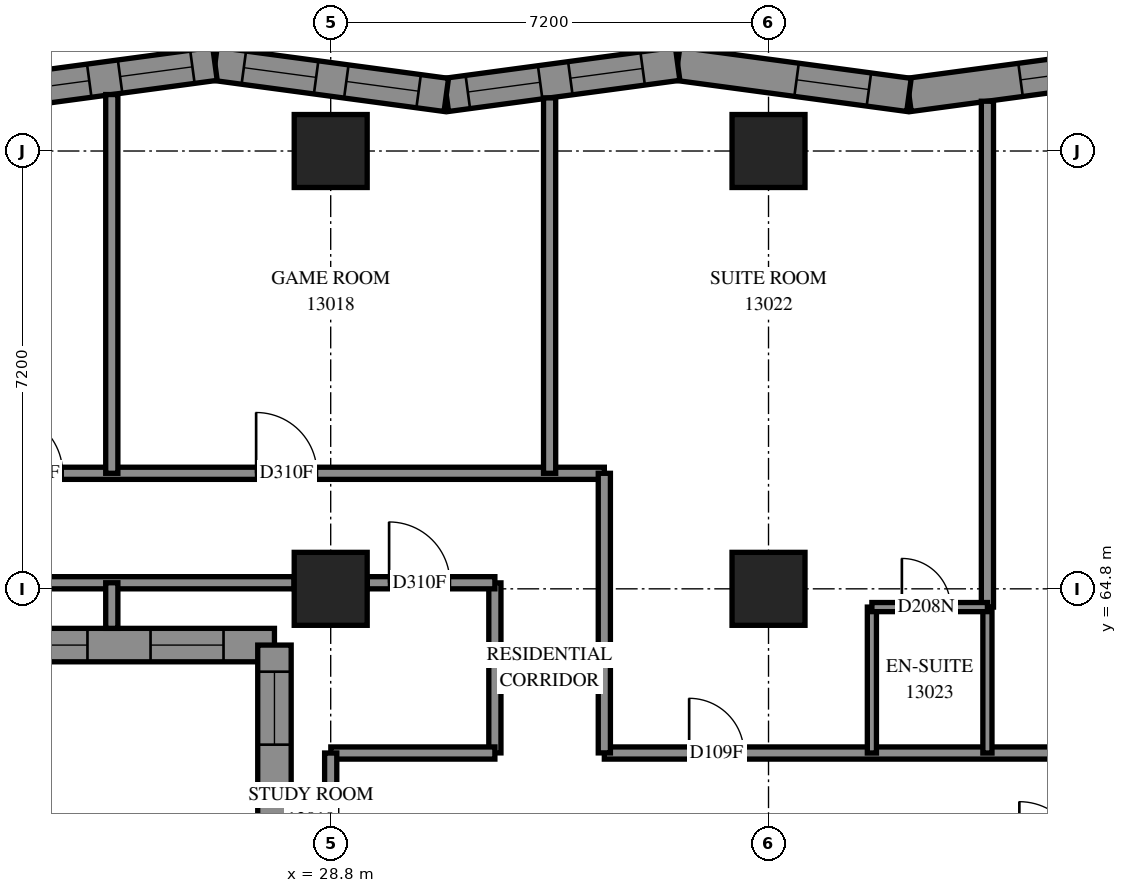
"""IFC4 building model, lengths in metres.
Left out: names, types, materials, properties, quantities, classifications, styles, units other than length and angle.
Written with IfcOpenShell. Run it as: python <this file> out.ifc"""

import sys

from ifc_helpers import new_model, si_unit, direction, frame, frame_2d, origin, origin_2d, place, context, subcontext, project, spatial, polyline, rectangle, outline, extrude, element, fill, save


model = new_model("IFC4")
c1 = context("Model", 3, precision=1e-05, world=origin(), true_north=direction((0.0, 1.0)))
c2 = subcontext(c1, "Body", "Model", "MODEL_VIEW")
j1 = project(units=[si_unit("LENGTHUNIT", "METRE"), si_unit("PLANEANGLEUNIT", "RADIAN")], contexts=[c1])
p1 = place(None, origin())
s1 = spatial("IfcSite", under=j1, at=p1, CompositionType="ELEMENT")
p2 = place(p1, origin())
s2 = spatial("IfcBuilding", under=s1, at=p2, CompositionType="ELEMENT")
p3 = place(p2, frame((0.0, 0.0, 50.8)))
s3 = spatial("IfcBuildingStorey", under=s2, at=p3, CompositionType="ELEMENT", Elevation=50.8)
for number, where, z_axis, x_axis in (
    (1, (28.8, 64.8, 0.0), (0.0, 0.0, 1.0), (1.0, 0.0, 0.0)),
    (2, (28.8, 72.0, 0.0), (0.0, 0.0, 1.0), (1.0, 0.0, 0.0)),
    (3, (36.0, 64.8, 0.0), (0.0, 0.0, 1.0), (1.0, 0.0, 0.0)),
    (4, (36.0, 72.0, 0.0), (0.0, 0.0, 1.0), (1.0, 0.0, 0.0)),
):
    element("IfcColumn", number, at=place(p3, frame(where, z_axis=z_axis, x_axis=x_axis)), inside=s3, PredefinedType="COLUMN", context=c2, shape_type="SweptSolid", body=[
        extrude(rectangle(XDim=1.2, YDim=1.2, at=origin_2d()), origin(), (0.0, 0.0, 1.0), 3.1),
    ])
p4 = place(p3, frame((42.114, 73.434, 0.0), z_axis=(0.0, 0.0, 1.0), x_axis=(-0.9910647018, -0.133381996, 0.0)))
e5 = element("IfcWall", 5, at=p4, inside=s3, PredefinedType="SOLIDWALL", context=c2, shape_type="SweptSolid", body=[
    extrude(outline(polyline([(-0.037, -0.275), (3.802, -0.275), (3.876, 0.275), (0.037, 0.275), (-0.037, -0.275)])), origin(), (0.0, 0.0, 1.0), 3.1),
])
p5 = place(p4, frame((0.787, 0.0, 0.5)))
e6 = element("IfcOpeningElement", 6, at=p5, cuts=e5, PredefinedType="OPENING", context=c2, shape_type="SweptSolid", body=[
    extrude(rectangle(XDim=1.2, YDim=2.45, at=frame_2d((0.6, 1.225))), frame((0.0, 0.285, 0.0), z_axis=(0.0, -1.0, 0.0), x_axis=(1.0, 0.0, 0.0)), (0.0, 0.0, 1.0), 0.57),
])
p6 = place(p3, frame((38.31, 72.922, 0.0), z_axis=(0.0, 0.0, 1.0), x_axis=(-0.9910651652, 0.1333785524, 0.0)))
e7 = element("IfcWall", 7, at=p6, inside=s3, PredefinedType="SOLIDWALL", context=c2, shape_type="SweptSolid", body=[
    extrude(outline(polyline([(0.037, -0.275), (3.876, -0.275), (3.802, 0.275), (-0.037, 0.275), (0.037, -0.275)])), origin(), (0.0, 0.0, 1.0), 3.1),
])
p7 = place(p6, frame((0.665, 0.0, 0.5)))
e8 = element("IfcOpeningElement", 8, at=p7, cuts=e7, PredefinedType="OPENING", context=c2, shape_type="SweptSolid", body=[
    extrude(rectangle(XDim=1.2, YDim=2.45, at=frame_2d((0.6, 1.225))), frame((0.0, 0.285, 0.0), z_axis=(0.0, -1.0, 0.0), x_axis=(1.0, 0.0, 0.0)), (0.0, 0.0, 1.0), 0.57),
])
p8 = place(p3, frame((34.505, 73.434, 0.0), z_axis=(0.0, 0.0, 1.0), x_axis=(-0.9910647018, -0.133381996, 0.0)))
e9 = element("IfcWall", 9, at=p8, inside=s3, PredefinedType="SOLIDWALL", context=c2, shape_type="SweptSolid", body=[
    extrude(outline(polyline([(-0.037, -0.275), (3.802, -0.275), (3.876, 0.275), (0.037, 0.275), (-0.037, -0.275)])), origin(), (0.0, 0.0, 1.0), 3.1),
])
p9 = place(p8, frame((0.581, 0.0, 0.5)))
e10 = element("IfcOpeningElement", 10, at=p9, cuts=e9, PredefinedType="OPENING", context=c2, shape_type="SweptSolid", body=[
    extrude(rectangle(XDim=1.2, YDim=2.45, at=frame_2d((0.6, 1.225))), frame((0.0, 0.285, 0.0), z_axis=(0.0, -1.0, 0.0), x_axis=(1.0, 0.0, 0.0)), (0.0, 0.0, 1.0), 0.57),
])
p10 = place(p8, frame((2.281, 0.0, 0.5)))
e11 = element("IfcOpeningElement", 11, at=p10, cuts=e9, PredefinedType="OPENING", context=c2, shape_type="SweptSolid", body=[
    extrude(rectangle(XDim=1.2, YDim=2.45, at=frame_2d((0.6, 1.225))), frame((0.0, 0.285, 0.0), z_axis=(0.0, -1.0, 0.0), x_axis=(1.0, 0.0, 0.0)), (0.0, 0.0, 1.0), 0.57),
])
p11 = place(p3, frame((30.701, 72.922, 0.0), z_axis=(0.0, 0.0, 1.0), x_axis=(-0.9910651652, 0.1333785524, 0.0)))
e12 = element("IfcWall", 12, at=p11, inside=s3, PredefinedType="SOLIDWALL", context=c2, shape_type="SweptSolid", body=[
    extrude(outline(polyline([(0.037, -0.275), (3.876, -0.275), (3.802, 0.275), (-0.037, 0.275), (0.037, -0.275)])), origin(), (0.0, 0.0, 1.0), 3.1),
])
p12 = place(p11, frame((0.459, 0.0, 0.5)))
e13 = element("IfcOpeningElement", 13, at=p12, cuts=e12, PredefinedType="OPENING", context=c2, shape_type="SweptSolid", body=[
    extrude(rectangle(XDim=1.2, YDim=2.45, at=frame_2d((0.6, 1.225))), frame((0.0, 0.285, 0.0), z_axis=(0.0, -1.0, 0.0), x_axis=(1.0, 0.0, 0.0)), (0.0, 0.0, 1.0), 0.57),
])
p13 = place(p11, frame((2.16, 0.0, 0.5)))
e14 = element("IfcOpeningElement", 14, at=p13, cuts=e12, PredefinedType="OPENING", context=c2, shape_type="SweptSolid", body=[
    extrude(rectangle(XDim=1.2, YDim=2.45, at=frame_2d((0.6, 1.225))), frame((0.0, 0.285, 0.0), z_axis=(0.0, -1.0, 0.0), x_axis=(1.0, 0.0, 0.0)), (0.0, 0.0, 1.0), 0.57),
])
p14 = place(p3, frame((26.897, 73.434, 0.0), z_axis=(0.0, 0.0, 1.0), x_axis=(-0.9910665233, -0.1333684607, 0.0)))
e15 = element("IfcWall", 15, at=p14, inside=s3, PredefinedType="SOLIDWALL", context=c2, shape_type="SweptSolid", body=[
    extrude(outline(polyline([(-0.037, -0.275), (3.802, -0.275), (3.918, 0.275), (0.037, 0.275), (-0.037, -0.275)])), origin(), (0.0, 0.0, 1.0), 3.1),
])
p15 = place(p14, frame((0.374, 0.0, 0.5)))
e16 = element("IfcOpeningElement", 16, at=p15, cuts=e15, PredefinedType="OPENING", context=c2, shape_type="SweptSolid", body=[
    extrude(rectangle(XDim=1.2, YDim=2.45, at=frame_2d((0.6, 1.225))), frame((0.0, 0.285, 0.0), z_axis=(0.0, -1.0, 0.0), x_axis=(1.0, 0.0, 0.0)), (0.0, 0.0, 1.0), 0.57),
])
p16 = place(p14, frame((2.086, 0.0, 0.5)))
e17 = element("IfcOpeningElement", 17, at=p16, cuts=e15, PredefinedType="OPENING", context=c2, shape_type="SweptSolid", body=[
    extrude(rectangle(XDim=1.2, YDim=2.45, at=frame_2d((0.6, 1.225))), frame((0.0, 0.285, 0.0), z_axis=(0.0, -1.0, 0.0), x_axis=(1.0, 0.0, 0.0)), (0.0, 0.0, 1.0), 0.57),
])
p17 = place(p3, frame((19.563, 63.875, 0.0), z_axis=(0.0, 0.0, 1.0), x_axis=(1.0, 0.0, 0.0)))
e18 = element("IfcWall", 18, at=p17, inside=s3, PredefinedType="SOLIDWALL", context=c2, shape_type="SweptSolid", body=[
    extrude(outline(polyline([(-0.275, -0.275), (8.037, -0.275), (8.587, 0.275), (0.275, 0.275), (-0.275, -0.275)])), origin(), (0.0, 0.0, 1.0), 3.1),
])
p18 = place(p17, frame((2.437, 0.0, 0.5)))
e19 = element("IfcOpeningElement", 19, at=p18, cuts=e18, PredefinedType="OPENING", context=c2, shape_type="SweptSolid", body=[
    extrude(rectangle(XDim=2.8, YDim=2.45, at=frame_2d((1.4, 1.225))), frame((0.0, 0.285, 0.0), z_axis=(0.0, -1.0, 0.0), x_axis=(1.0, 0.0, 0.0)), (0.0, 0.0, 1.0), 0.57),
])
p19 = place(p17, frame((6.274, 0.0, 0.5)))
e20 = element("IfcOpeningElement", 20, at=p19, cuts=e18, PredefinedType="OPENING", context=c2, shape_type="SweptSolid", body=[
    extrude(rectangle(XDim=1.2, YDim=2.45, at=frame_2d((0.6, 1.225))), frame((0.0, 0.285, 0.0), z_axis=(0.0, -1.0, 0.0), x_axis=(1.0, 0.0, 0.0)), (0.0, 0.0, 1.0), 0.57),
])
p20 = place(p3, frame((27.875, 63.875, 0.0), z_axis=(0.0, 0.0, 1.0), x_axis=(0.0, -1.0, 0.0)))
e21 = element("IfcWall", 21, at=p20, inside=s3, PredefinedType="SOLIDWALL", context=c2, shape_type="SweptSolid", body=[
    extrude(outline(polyline([(0.275, -0.275), (8.587, -0.275), (8.037, 0.275), (-0.275, 0.275), (0.275, -0.275)])), origin(), (0.0, 0.0, 1.0), 3.1),
])
p21 = place(p20, frame((0.438, 0.0, 0.5)))
e22 = element("IfcOpeningElement", 22, at=p21, cuts=e21, PredefinedType="OPENING", context=c2, shape_type="SweptSolid", body=[
    extrude(rectangle(XDim=1.2, YDim=2.45, at=frame_2d((0.6, 1.225))), frame((0.0, 0.285, 0.0), z_axis=(0.0, -1.0, 0.0), x_axis=(1.0, 0.0, 0.0)), (0.0, 0.0, 1.0), 0.57),
])
p22 = place(p20, frame((3.875, 0.0, 0.7)))
e23 = element("IfcOpeningElement", 23, at=p22, cuts=e21, PredefinedType="OPENING", context=c2, shape_type="SweptSolid", body=[
    extrude(rectangle(XDim=1.8, YDim=2.2, at=frame_2d((0.9, 1.1))), frame((0.0, 0.285, 0.0), z_axis=(0.0, -1.0, 0.0), x_axis=(1.0, 0.0, 0.0)), (0.0, 0.0, 1.0), 0.57),
])
p23 = place(p3, frame((33.3, 62.1, 0.0), z_axis=(0.0, 0.0, 1.0), x_axis=(1.0, 0.0, 0.0)))
e24 = element("IfcWall", 24, at=p23, inside=s3, PredefinedType="PARTITIONING", context=c2, shape_type="SweptSolid", body=[
    extrude(rectangle(XDim=21.2, YDim=0.2, at=frame_2d((10.6, 0.0))), origin(), (0.0, 0.0, 1.0), 3.1),
])
p24 = place(p23, frame((1.395, 0.0, 0.0)))
e25 = element("IfcOpeningElement", 25, at=p24, cuts=e24, PredefinedType="OPENING", context=c2, shape_type="SweptSolid", body=[
    extrude(rectangle(XDim=0.9, YDim=2.1, at=frame_2d((0.45, 1.05))), frame((0.0, 0.11, 0.0), z_axis=(0.0, -1.0, 0.0), x_axis=(1.0, 0.0, 0.0)), (0.0, 0.0, 1.0), 0.22),
])
p25 = place(p23, frame((8.674, 0.0, 0.0)))
e26 = element("IfcOpeningElement", 26, at=p25, cuts=e24, PredefinedType="OPENING", context=c2, shape_type="SweptSolid", body=[
    extrude(rectangle(XDim=1.0, YDim=2.1, at=frame_2d((0.5, 1.05))), frame((0.0, 0.11, 0.0), z_axis=(0.0, -1.0, 0.0), x_axis=(1.0, 0.0, 0.0)), (0.0, 0.0, 1.0), 0.22),
])
p26 = place(p23, frame((15.874, 0.0, 0.0)))
e27 = element("IfcOpeningElement", 27, at=p26, cuts=e24, PredefinedType="OPENING", context=c2, shape_type="SweptSolid", body=[
    extrude(rectangle(XDim=1.0, YDim=2.1, at=frame_2d((0.5, 1.05))), frame((0.0, 0.11, 0.0), z_axis=(0.0, -1.0, 0.0), x_axis=(1.0, 0.0, 0.0)), (0.0, 0.0, 1.0), 0.22),
])
p27 = place(p3, frame((21.602, 66.7, 0.0), z_axis=(0.0, 0.0, 1.0), x_axis=(1.0, 0.0, 0.0)))
e28 = element("IfcWall", 28, at=p27, inside=s3, PredefinedType="PARTITIONING", context=c2, shape_type="SweptSolid", body=[
    extrude(rectangle(XDim=11.698, YDim=0.2, at=frame_2d((5.849, 0.0))), origin(), (0.0, 0.0, 1.0), 3.1),
])
p28 = place(p27, frame((1.79, 0.0, 0.0)))
e29 = element("IfcOpeningElement", 29, at=p28, cuts=e28, PredefinedType="OPENING", context=c2, shape_type="SweptSolid", body=[
    extrude(rectangle(XDim=1.0, YDim=2.1, at=frame_2d((0.5, 1.05))), frame((0.0, 0.11, 0.0), z_axis=(0.0, -1.0, 0.0), x_axis=(1.0, 0.0, 0.0)), (0.0, 0.0, 1.0), 0.22),
])
p29 = place(p27, frame((5.972, 0.0, 0.0)))
e30 = element("IfcOpeningElement", 30, at=p29, cuts=e28, PredefinedType="OPENING", context=c2, shape_type="SweptSolid", body=[
    extrude(rectangle(XDim=1.0, YDim=2.1, at=frame_2d((0.5, 1.05))), frame((0.0, 0.11, 0.0), z_axis=(0.0, -1.0, 0.0), x_axis=(1.0, 0.0, 0.0)), (0.0, 0.0, 1.0), 0.22),
])
p30 = place(p3, frame((39.6, 64.5, 0.0), z_axis=(0.0, 0.0, 1.0), x_axis=(0.0, 1.0, 0.0)))
e31 = element("IfcWall", 31, at=p30, inside=s3, PredefinedType="PARTITIONING", context=c2, shape_type="SweptSolid", body=[
    extrude(rectangle(XDim=8.319, YDim=0.2, at=frame_2d((4.159, 0.0))), origin(), (0.0, 0.0, 1.0), 3.1),
])
p31 = place(p3, frame((25.2, 66.7, 0.0), z_axis=(0.0, 0.0, 1.0), x_axis=(0.0, 1.0, 0.0)))
e32 = element("IfcWall", 32, at=p31, inside=s3, PredefinedType="PARTITIONING", context=c2, shape_type="SweptSolid", body=[
    extrude(rectangle(XDim=6.229, YDim=0.2, at=frame_2d((3.114, 0.0))), origin(), (0.0, 0.0, 1.0), 3.1),
])
p32 = place(p3, frame((32.4, 66.7, 0.0), z_axis=(0.0, 0.0, 1.0), x_axis=(0.0, 1.0, 0.0)))
e33 = element("IfcWall", 33, at=p32, inside=s3, PredefinedType="PARTITIONING", context=c2, shape_type="SweptSolid", body=[
    extrude(rectangle(XDim=6.174, YDim=0.2, at=frame_2d((3.087, 0.0))), origin(), (0.0, 0.0, 1.0), 3.1),
])
p33 = place(p3, frame((22.2, 64.9, 0.0), z_axis=(0.0, 0.0, 1.0), x_axis=(1.0, 0.0, 0.0)))
e34 = element("IfcWall", 34, at=p33, inside=s3, PredefinedType="PARTITIONING", context=c2, shape_type="SweptSolid", body=[
    extrude(rectangle(XDim=6.0, YDim=0.2, at=frame_2d((3.0, 0.0))), origin(), (0.0, 0.0, 1.0), 2.6),
])
p34 = place(p3, frame((33.3, 62.102, 0.0), z_axis=(0.0, 0.0, 1.0), x_axis=(0.0, 1.0, 0.0)))
e35 = element("IfcWall", 35, at=p34, inside=s3, PredefinedType="PARTITIONING", context=c2, shape_type="SweptSolid", body=[
    extrude(rectangle(XDim=4.598, YDim=0.2, at=frame_2d((2.299, 0.0))), origin(), (0.0, 0.0, 1.0), 3.1),
])
p35 = place(p3, frame((31.5, 62.102, 0.0), z_axis=(0.0, 0.0, 1.0), x_axis=(0.0, 1.0, 0.0)))
e36 = element("IfcWall", 36, at=p35, inside=s3, PredefinedType="PARTITIONING", context=c2, shape_type="SweptSolid", body=[
    extrude(rectangle(XDim=2.796, YDim=0.2, at=frame_2d((1.398, 0.0))), origin(), (0.0, 0.0, 1.0), 3.1),
])
p36 = place(p3, frame((28.802, 62.1, 0.0), z_axis=(0.0, 0.0, 1.0), x_axis=(1.0, 0.0, 0.0)))
e37 = element("IfcWall", 37, at=p36, inside=s3, PredefinedType="PARTITIONING", context=c2, shape_type="SweptSolid", body=[
    extrude(rectangle(XDim=2.698, YDim=0.2, at=frame_2d((1.349, 0.0))), origin(), (0.0, 0.0, 1.0), 3.1),
])
for number, where, z_axis, x_axis in (
    (38, (37.7, 62.1, 0.0), (0.0, 0.0, 1.0), (0.0, 1.0, 0.0)),
    (39, (39.6, 62.1, 0.0), (0.0, 0.0, 1.0), (0.0, 1.0, 0.0)),
):
    element("IfcWall", number, at=place(p3, frame(where, z_axis=z_axis, x_axis=x_axis)), inside=s3, PredefinedType="PARTITIONING", context=c2, shape_type="SweptSolid", body=[
        extrude(rectangle(XDim=2.4, YDim=0.15, at=frame_2d((1.2, 0.0))), origin(), (0.0, 0.0, 1.0), 3.1),
    ])
p37 = place(p3, frame((29.4, 64.9, 0.0), z_axis=(0.0, 0.0, 1.0), x_axis=(1.0, 0.0, 0.0)))
e40 = element("IfcWall", 40, at=p37, inside=s3, PredefinedType="PARTITIONING", context=c2, shape_type="SweptSolid", body=[
    extrude(rectangle(XDim=2.1, YDim=0.2, at=frame_2d((1.05, 0.0))), origin(), (0.0, 0.0, 1.0), 3.1),
])
p38 = place(p37, frame((0.36, 0.0, 0.0)))
e41 = element("IfcOpeningElement", 41, at=p38, cuts=e40, PredefinedType="OPENING", context=c2, shape_type="SweptSolid", body=[
    extrude(rectangle(XDim=1.0, YDim=2.1, at=frame_2d((0.5, 1.05))), frame((0.0, 0.11, 0.0), z_axis=(0.0, -1.0, 0.0), x_axis=(1.0, 0.0, 0.0)), (0.0, 0.0, 1.0), 0.22),
])
p39 = place(p3, frame((37.7, 64.5, 0.0), z_axis=(0.0, 0.0, 1.0), x_axis=(1.0, 0.0, 0.0)))
e42 = element("IfcWall", 42, at=p39, inside=s3, PredefinedType="PARTITIONING", context=c2, shape_type="SweptSolid", body=[
    extrude(rectangle(XDim=1.9, YDim=0.15, at=frame_2d((0.95, 0.0))), origin(), (0.0, 0.0, 1.0), 3.1),
])
p40 = place(p39, frame((0.493, 0.0, 0.0)))
e43 = element("IfcOpeningElement", 43, at=p40, cuts=e42, PredefinedType="OPENING", context=c2, shape_type="SweptSolid", body=[
    extrude(rectangle(XDim=0.8, YDim=2.1, at=frame_2d((0.4, 1.05))), frame((0.0, 0.085, 0.0), z_axis=(0.0, -1.0, 0.0), x_axis=(1.0, 0.0, 0.0)), (0.0, 0.0, 1.0), 0.17),
])
p41 = place(p3, frame((28.8, 60.302, 0.0), z_axis=(0.0, 0.0, 1.0), x_axis=(0.0, 1.0, 0.0)))
e44 = element("IfcWall", 44, at=p41, inside=s3, PredefinedType="PARTITIONING", context=c2, shape_type="SweptSolid", body=[
    extrude(rectangle(XDim=1.798, YDim=0.2, at=frame_2d((0.899, 0.0))), origin(), (0.0, 0.0, 1.0), 2.6),
])
p42 = place(p3, frame((25.2, 64.15, 0.0), z_axis=(0.0, 0.0, 1.0), x_axis=(0.0, 1.0, 0.0)))
e45 = element("IfcWall", 45, at=p42, inside=s3, PredefinedType="PARTITIONING", context=c2, shape_type="SweptSolid", body=[
    extrude(rectangle(XDim=0.75, YDim=0.2, at=frame_2d((0.375, 0.0))), origin(), (0.0, 0.0, 1.0), 3.1),
])
p43 = place(p3, frame((28.2, 64.9, 0.0), z_axis=(0.0, 0.0, 1.0), x_axis=(1.0, 0.0, 0.0)))
e46 = element("IfcWall", 46, at=p43, inside=s3, PredefinedType="PARTITIONING", context=c2, shape_type="SweptSolid", body=[
    extrude(rectangle(XDim=1.2, YDim=0.2, at=frame_2d((0.6, 0.0))), origin(), (0.0, 0.0, 1.0), 3.1),
])
p44 = place(p5, origin())
e47 = element("IfcWindow", 47, at=p44, inside=s3, PartitioningType="SINGLE_PANEL", PredefinedType="WINDOW", context=c2, shape_type="SweptSolid", body=[
    extrude(rectangle(XDim=1.2, YDim=2.45, at=frame_2d((0.6, 1.225))), frame((0.0, 0.155, 0.0), z_axis=(0.0, -1.0, 0.0), x_axis=(1.0, 0.0, 0.0)), (0.0, 0.0, 1.0), 0.06),
])
fill(e6, e47)
p45 = place(p7, origin())
e48 = element("IfcWindow", 48, at=p45, inside=s3, PartitioningType="SINGLE_PANEL", PredefinedType="WINDOW", context=c2, shape_type="SweptSolid", body=[
    extrude(rectangle(XDim=1.2, YDim=2.45, at=frame_2d((0.6, 1.225))), frame((0.0, 0.155, 0.0), z_axis=(0.0, -1.0, 0.0), x_axis=(1.0, 0.0, 0.0)), (0.0, 0.0, 1.0), 0.06),
])
fill(e8, e48)
p46 = place(p9, origin())
e49 = element("IfcWindow", 49, at=p46, inside=s3, PartitioningType="SINGLE_PANEL", PredefinedType="WINDOW", context=c2, shape_type="SweptSolid", body=[
    extrude(rectangle(XDim=1.2, YDim=2.45, at=frame_2d((0.6, 1.225))), frame((0.0, 0.155, 0.0), z_axis=(0.0, -1.0, 0.0), x_axis=(1.0, 0.0, 0.0)), (0.0, 0.0, 1.0), 0.06),
])
fill(e10, e49)
p47 = place(p10, origin())
e50 = element("IfcWindow", 50, at=p47, inside=s3, PartitioningType="SINGLE_PANEL", PredefinedType="WINDOW", context=c2, shape_type="SweptSolid", body=[
    extrude(rectangle(XDim=1.2, YDim=2.45, at=frame_2d((0.6, 1.225))), frame((0.0, 0.155, 0.0), z_axis=(0.0, -1.0, 0.0), x_axis=(1.0, 0.0, 0.0)), (0.0, 0.0, 1.0), 0.06),
])
fill(e11, e50)
p48 = place(p12, origin())
e51 = element("IfcWindow", 51, at=p48, inside=s3, PartitioningType="SINGLE_PANEL", PredefinedType="WINDOW", context=c2, shape_type="SweptSolid", body=[
    extrude(rectangle(XDim=1.2, YDim=2.45, at=frame_2d((0.6, 1.225))), frame((0.0, 0.155, 0.0), z_axis=(0.0, -1.0, 0.0), x_axis=(1.0, 0.0, 0.0)), (0.0, 0.0, 1.0), 0.06),
])
fill(e13, e51)
p49 = place(p13, origin())
e52 = element("IfcWindow", 52, at=p49, inside=s3, PartitioningType="SINGLE_PANEL", PredefinedType="WINDOW", context=c2, shape_type="SweptSolid", body=[
    extrude(rectangle(XDim=1.2, YDim=2.45, at=frame_2d((0.6, 1.225))), frame((0.0, 0.155, 0.0), z_axis=(0.0, -1.0, 0.0), x_axis=(1.0, 0.0, 0.0)), (0.0, 0.0, 1.0), 0.06),
])
fill(e14, e52)
p50 = place(p15, origin())
e53 = element("IfcWindow", 53, at=p50, inside=s3, PartitioningType="SINGLE_PANEL", PredefinedType="WINDOW", context=c2, shape_type="SweptSolid", body=[
    extrude(rectangle(XDim=1.2, YDim=2.45, at=frame_2d((0.6, 1.225))), frame((0.0, 0.155, 0.0), z_axis=(0.0, -1.0, 0.0), x_axis=(1.0, 0.0, 0.0)), (0.0, 0.0, 1.0), 0.06),
])
fill(e16, e53)
p51 = place(p16, origin())
e54 = element("IfcWindow", 54, at=p51, inside=s3, PartitioningType="SINGLE_PANEL", PredefinedType="WINDOW", context=c2, shape_type="SweptSolid", body=[
    extrude(rectangle(XDim=1.2, YDim=2.45, at=frame_2d((0.6, 1.225))), frame((0.0, 0.155, 0.0), z_axis=(0.0, -1.0, 0.0), x_axis=(1.0, 0.0, 0.0)), (0.0, 0.0, 1.0), 0.06),
])
fill(e17, e54)
p52 = place(p18, origin())
e55 = element("IfcWindow", 55, at=p52, inside=s3, PartitioningType="SINGLE_PANEL", PredefinedType="WINDOW", context=c2, shape_type="SweptSolid", body=[
    extrude(rectangle(XDim=2.8, YDim=2.45, at=frame_2d((1.4, 1.225))), frame((0.0, 0.155, 0.0), z_axis=(0.0, -1.0, 0.0), x_axis=(1.0, 0.0, 0.0)), (0.0, 0.0, 1.0), 0.06),
])
fill(e19, e55)
p53 = place(p19, origin())
e56 = element("IfcWindow", 56, at=p53, inside=s3, PartitioningType="SINGLE_PANEL", PredefinedType="WINDOW", context=c2, shape_type="SweptSolid", body=[
    extrude(rectangle(XDim=1.2, YDim=2.45, at=frame_2d((0.6, 1.225))), frame((0.0, 0.155, 0.0), z_axis=(0.0, -1.0, 0.0), x_axis=(1.0, 0.0, 0.0)), (0.0, 0.0, 1.0), 0.06),
])
fill(e20, e56)
p54 = place(p21, origin())
e57 = element("IfcWindow", 57, at=p54, inside=s3, PartitioningType="SINGLE_PANEL", PredefinedType="WINDOW", context=c2, shape_type="SweptSolid", body=[
    extrude(rectangle(XDim=1.2, YDim=2.45, at=frame_2d((0.6, 1.225))), frame((0.0, 0.155, 0.0), z_axis=(0.0, -1.0, 0.0), x_axis=(1.0, 0.0, 0.0)), (0.0, 0.0, 1.0), 0.06),
])
fill(e22, e57)
p55 = place(p28, origin())
e58 = element("IfcDoor", 58, at=p55, inside=s3, OperationType="SINGLE_SWING_RIGHT", PredefinedType="DOOR", context=c2, shape_type="SweptSolid", body=[
    extrude(rectangle(XDim=1.0, YDim=2.1, at=frame_2d((0.5, 1.05))), frame((0.0, 0.025, 0.0), z_axis=(0.0, -1.0, 0.0), x_axis=(1.0, 0.0, 0.0)), (0.0, 0.0, 1.0), 0.05),
])
fill(e29, e58)
p56 = place(p29, origin())
e59 = element("IfcDoor", 59, at=p56, inside=s3, OperationType="SINGLE_SWING_LEFT", PredefinedType="DOOR", context=c2, shape_type="SweptSolid", body=[
    extrude(rectangle(XDim=1.0, YDim=2.1, at=frame_2d((0.5, 1.05))), frame((0.0, 0.025, 0.0), z_axis=(0.0, -1.0, 0.0), x_axis=(1.0, 0.0, 0.0)), (0.0, 0.0, 1.0), 0.05),
])
fill(e30, e59)
p57 = place(p38, origin())
e60 = element("IfcDoor", 60, at=p57, inside=s3, OperationType="SINGLE_SWING_RIGHT", PredefinedType="DOOR", context=c2, shape_type="SweptSolid", body=[
    extrude(rectangle(XDim=1.0, YDim=2.1, at=frame_2d((0.5, 1.05))), frame((0.0, 0.025, 0.0), z_axis=(0.0, -1.0, 0.0), x_axis=(1.0, 0.0, 0.0)), (0.0, 0.0, 1.0), 0.05),
])
fill(e41, e60)
p58 = place(p24, origin())
e61 = element("IfcDoor", 61, at=p58, inside=s3, OperationType="SINGLE_SWING_LEFT", PredefinedType="DOOR", context=c2, shape_type="SweptSolid", body=[
    extrude(rectangle(XDim=0.9, YDim=2.1, at=frame_2d((0.45, 1.05))), frame((0.0, 0.025, 0.0), z_axis=(0.0, -1.0, 0.0), x_axis=(1.0, 0.0, 0.0)), (0.0, 0.0, 1.0), 0.05),
])
fill(e25, e61)
p59 = place(p40, origin())
e62 = element("IfcDoor", 62, at=p59, inside=s3, OperationType="SINGLE_SWING_RIGHT", PredefinedType="DOOR", context=c2, shape_type="SweptSolid", body=[
    extrude(rectangle(XDim=0.8, YDim=2.1, at=frame_2d((0.4, 1.05))), frame((0.0, 0.025, 0.0), z_axis=(0.0, -1.0, 0.0), x_axis=(1.0, 0.0, 0.0)), (0.0, 0.0, 1.0), 0.05),
])
fill(e43, e62)
save(model, sys.argv[1])
